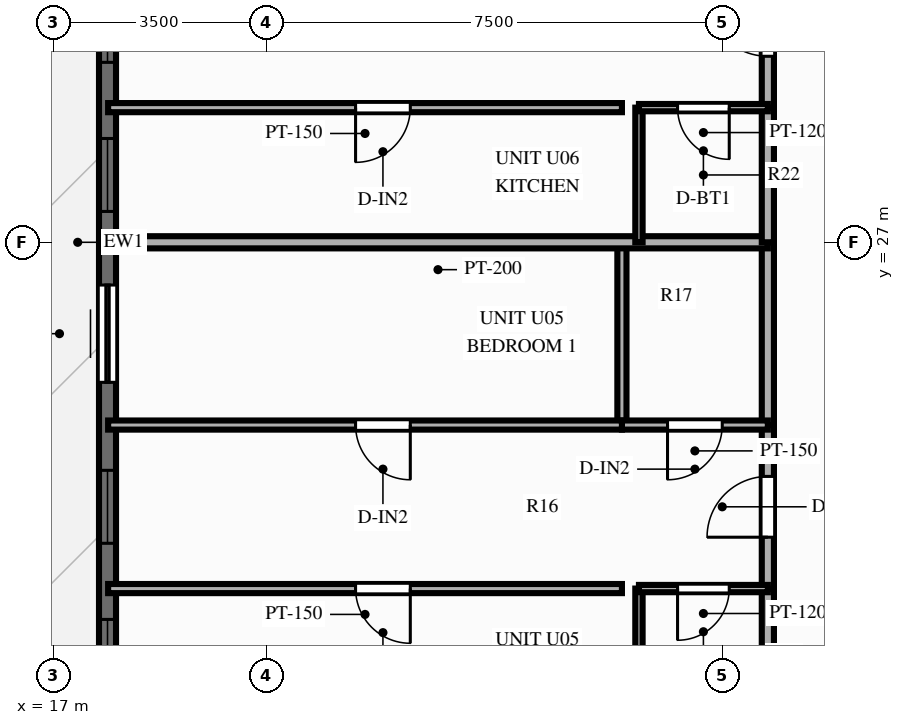
"""IFC4 building model, lengths in metres.
Left out: names, types, materials, properties, quantities, classifications, styles, units other than length and angle.
Written with IfcOpenShell. Run it as: python <this file> out.ifc"""

import sys

from ifc_helpers import new_model, si_unit, direction, frame, frame_2d, origin, place, context, subcontext, project, spatial, rectangle, extrude, source, transform, mapped, element, fill, save


model = new_model("IFC4")
c1 = context("Model", 3, precision=1e-05, world=origin(), true_north=direction((0.0, 1.0)))
c2 = subcontext(c1, "Body", "Model", "MODEL_VIEW")
j1 = project(units=[si_unit("LENGTHUNIT", "METRE"), si_unit("PLANEANGLEUNIT", "RADIAN")], contexts=[c1])
p1 = place(None, origin())
s1 = spatial("IfcSite", under=j1, at=p1, CompositionType="ELEMENT")
p2 = place(p1, origin())
s2 = spatial("IfcBuilding", under=s1, at=p2, CompositionType="ELEMENT")
p3 = place(p2, frame((0.0, 0.0, 189.7)))
s3 = spatial("IfcBuildingStorey", under=s2, at=p3, CompositionType="ELEMENT", Elevation=189.7)
p4 = place(p3, frame((17.89, 11.0, 0.0), z_axis=(0.0, 0.0, 1.0), x_axis=(0.0, 1.0, 0.0)))
e1 = element("IfcWall", 1, at=p4, inside=s3, PredefinedType="SOLIDWALL", context=c2, shape_type="SweptSolid", body=[
    extrude(rectangle(XDim=32.0, YDim=0.28, at=frame_2d((16.0, 0.0))), origin(), (0.0, 0.0, 1.0), 2.28),
])
p5 = place(p4, frame((0.717, 0.0, 0.25)))
e2 = element("IfcOpeningElement", 2, at=p5, cuts=e1, PredefinedType="OPENING", context=c2, shape_type="SweptSolid", body=[
    extrude(rectangle(XDim=1.2, YDim=1.5, at=frame_2d((0.6, 0.75))), frame((0.0, 0.152, 0.0), z_axis=(0.0, -1.0, 0.0), x_axis=(1.0, 0.0, 0.0)), (0.0, 0.0, 1.0), 0.304),
])
p6 = place(p4, frame((3.139, 0.0, 0.25)))
e3 = element("IfcOpeningElement", 3, at=p6, cuts=e1, PredefinedType="OPENING", context=c2, shape_type="SweptSolid", body=[
    extrude(rectangle(XDim=1.2, YDim=1.5, at=frame_2d((0.6, 0.75))), frame((0.0, 0.152, 0.0), z_axis=(0.0, -1.0, 0.0), x_axis=(1.0, 0.0, 0.0)), (0.0, 0.0, 1.0), 0.304),
])
p7 = place(p4, frame((5.447, 0.0, 0.25)))
e4 = element("IfcOpeningElement", 4, at=p7, cuts=e1, PredefinedType="OPENING", context=c2, shape_type="SweptSolid", body=[
    extrude(rectangle(XDim=0.95, YDim=1.5, at=frame_2d((0.475, 0.75))), frame((0.0, 0.152, 0.0), z_axis=(0.0, -1.0, 0.0), x_axis=(1.0, 0.0, 0.0)), (0.0, 0.0, 1.0), 0.304),
])
p8 = place(p4, frame((8.597, 0.0, 0.25)))
e5 = element("IfcOpeningElement", 5, at=p8, cuts=e1, PredefinedType="OPENING", context=c2, shape_type="SweptSolid", body=[
    extrude(rectangle(XDim=1.2, YDim=1.5, at=frame_2d((0.6, 0.75))), frame((0.0, 0.152, 0.0), z_axis=(0.0, -1.0, 0.0), x_axis=(1.0, 0.0, 0.0)), (0.0, 0.0, 1.0), 0.304),
])
p9 = place(p4, frame((11.05, 0.0, 0.25)))
e6 = element("IfcOpeningElement", 6, at=p9, cuts=e1, PredefinedType="OPENING", context=c2, shape_type="SweptSolid", body=[
    extrude(rectangle(XDim=1.2, YDim=1.5, at=frame_2d((0.6, 0.75))), frame((0.0, 0.152, 0.0), z_axis=(0.0, -1.0, 0.0), x_axis=(1.0, 0.0, 0.0)), (0.0, 0.0, 1.0), 0.304),
])
p10 = place(p4, frame((13.697, 0.0, 0.0)))
e7 = element("IfcOpeningElement", 7, at=p10, cuts=e1, PredefinedType="OPENING", context=c2, shape_type="SweptSolid", body=[
    extrude(rectangle(XDim=1.6, YDim=2.15, at=frame_2d((0.8, 1.075))), frame((0.0, 0.152, 0.0), z_axis=(0.0, -1.0, 0.0), x_axis=(1.0, 0.0, 0.0)), (0.0, 0.0, 1.0), 0.304),
])
p11 = place(p4, frame((16.507, 0.0, 0.25)))
e8 = element("IfcOpeningElement", 8, at=p11, cuts=e1, PredefinedType="OPENING", context=c2, shape_type="SweptSolid", body=[
    extrude(rectangle(XDim=1.2, YDim=1.5, at=frame_2d((0.6, 0.75))), frame((0.0, 0.152, 0.0), z_axis=(0.0, -1.0, 0.0), x_axis=(1.0, 0.0, 0.0)), (0.0, 0.0, 1.0), 0.304),
])
p12 = place(p4, frame((18.959, 0.0, 0.25)))
e9 = element("IfcOpeningElement", 9, at=p12, cuts=e1, PredefinedType="OPENING", context=c2, shape_type="SweptSolid", body=[
    extrude(rectangle(XDim=1.2, YDim=1.5, at=frame_2d((0.6, 0.75))), frame((0.0, 0.152, 0.0), z_axis=(0.0, -1.0, 0.0), x_axis=(1.0, 0.0, 0.0)), (0.0, 0.0, 1.0), 0.304),
])
p13 = place(p4, frame((21.807, 0.0, 0.25)))
e10 = element("IfcOpeningElement", 10, at=p13, cuts=e1, PredefinedType="OPENING", context=c2, shape_type="SweptSolid", body=[
    extrude(rectangle(XDim=1.2, YDim=1.5, at=frame_2d((0.6, 0.75))), frame((0.0, 0.152, 0.0), z_axis=(0.0, -1.0, 0.0), x_axis=(1.0, 0.0, 0.0)), (0.0, 0.0, 1.0), 0.304),
])
p14 = place(p4, frame((26.967, 0.0, 0.25)))
e11 = element("IfcOpeningElement", 11, at=p14, cuts=e1, PredefinedType="OPENING", context=c2, shape_type="SweptSolid", body=[
    extrude(rectangle(XDim=1.2, YDim=1.5, at=frame_2d((0.6, 0.75))), frame((0.0, 0.152, 0.0), z_axis=(0.0, -1.0, 0.0), x_axis=(1.0, 0.0, 0.0)), (0.0, 0.0, 1.0), 0.304),
])
p15 = place(p4, frame((29.687, 0.0, 0.25)))
e12 = element("IfcOpeningElement", 12, at=p15, cuts=e1, PredefinedType="OPENING", context=c2, shape_type="SweptSolid", body=[
    extrude(rectangle(XDim=1.2, YDim=1.5, at=frame_2d((0.6, 0.75))), frame((0.0, 0.152, 0.0), z_axis=(0.0, -1.0, 0.0), x_axis=(1.0, 0.0, 0.0)), (0.0, 0.0, 1.0), 0.304),
])
p16 = place(p3, frame((28.75, 19.09, 0.0), z_axis=(0.0, 0.0, 1.0), x_axis=(0.0, 1.0, 0.0)))
e13 = element("IfcWall", 13, at=p16, inside=s3, PredefinedType="PARTITIONING", context=c2, shape_type="SweptSolid", body=[
    extrude(rectangle(XDim=2.215, YDim=0.2, at=frame_2d((1.107, 0.0))), origin(), (0.0, 0.0, 1.0), 2.79),
])
p17 = place(p3, frame((28.75, 21.305, 0.0), z_axis=(0.0, 0.0, 1.0), x_axis=(0.0, 1.0, 0.0)))
e14 = element("IfcWall", 14, at=p17, inside=s3, PredefinedType="PARTITIONING", context=c2, shape_type="SweptSolid", body=[
    extrude(rectangle(XDim=2.689, YDim=0.2, at=frame_2d((1.345, 0.0))), origin(), (0.0, 0.0, 1.0), 2.79),
])
p18 = place(p17, frame((0.845, 0.0, 0.0)))
e15 = element("IfcOpeningElement", 15, at=p18, cuts=e14, PredefinedType="OPENING", context=c2, shape_type="SweptSolid", body=[
    extrude(rectangle(XDim=1.0, YDim=2.15, at=frame_2d((0.5, 1.075))), frame((0.0, 0.112, 0.0), z_axis=(0.0, -1.0, 0.0), x_axis=(1.0, 0.0, 0.0)), (0.0, 0.0, 1.0), 0.224),
])
p19 = place(p3, frame((28.75, 23.994, 0.0), z_axis=(0.0, 0.0, 1.0), x_axis=(0.0, 1.0, 0.0)))
e16 = element("IfcWall", 16, at=p19, inside=s3, PredefinedType="PARTITIONING", context=c2, shape_type="SweptSolid", body=[
    extrude(rectangle(XDim=3.006, YDim=0.2, at=frame_2d((1.503, 0.0))), origin(), (0.0, 0.0, 1.0), 2.79),
])
p20 = place(p3, frame((26.63, 19.09, 0.0), z_axis=(0.0, 0.0, 1.0), x_axis=(0.0, 1.0, 0.0)))
e17 = element("IfcWall", 17, at=p20, inside=s3, PredefinedType="PARTITIONING", context=c2, shape_type="SweptSolid", body=[
    extrude(rectangle(XDim=2.215, YDim=0.12, at=frame_2d((1.107, 0.0))), origin(), (0.0, 0.0, 1.0), 2.79),
])
p21 = place(p3, frame((26.35, 23.994, 0.0), z_axis=(0.0, 0.0, 1.0), x_axis=(0.0, 1.0, 0.0)))
e18 = element("IfcWall", 18, at=p21, inside=s3, PredefinedType="PARTITIONING", context=c2, shape_type="SweptSolid", body=[
    extrude(rectangle(XDim=3.006, YDim=0.15, at=frame_2d((1.503, 0.0))), origin(), (0.0, 0.0, 1.0), 2.79),
])
p22 = place(p3, frame((28.75, 21.305, 0.0), z_axis=(0.0, 0.0, 1.0), x_axis=(-1.0, 0.0, 0.0)))
e19 = element("IfcWall", 19, at=p22, inside=s3, PredefinedType="PARTITIONING", context=c2, shape_type="SweptSolid", body=[
    extrude(rectangle(XDim=2.12, YDim=0.12, at=frame_2d((1.06, 0.0))), origin(), (0.0, 0.0, 1.0), 2.79),
])
p23 = place(p22, frame((0.635, 0.0, 0.0)))
e20 = element("IfcOpeningElement", 20, at=p23, cuts=e19, PredefinedType="OPENING", context=c2, shape_type="SweptSolid", body=[
    extrude(rectangle(XDim=0.85, YDim=2.05, at=frame_2d((0.425, 1.025))), frame((0.0, 0.072, 0.0), z_axis=(0.0, -1.0, 0.0), x_axis=(1.0, 0.0, 0.0)), (0.0, 0.0, 1.0), 0.144),
])
p24 = place(p3, frame((26.35, 21.305, 0.0), z_axis=(0.0, 0.0, 1.0), x_axis=(-1.0, 0.0, 0.0)))
e21 = element("IfcWall", 21, at=p24, inside=s3, PredefinedType="PARTITIONING", context=c2, shape_type="SweptSolid", body=[
    extrude(rectangle(XDim=8.45, YDim=0.15, at=frame_2d((4.225, 0.0))), origin(), (0.0, 0.0, 1.0), 2.79),
])
p25 = place(p24, frame((3.48, 0.0, 0.0)))
e22 = element("IfcOpeningElement", 22, at=p25, cuts=e21, PredefinedType="OPENING", context=c2, shape_type="SweptSolid", body=[
    extrude(rectangle(XDim=0.9, YDim=2.1, at=frame_2d((0.45, 1.05))), frame((0.0, 0.087, 0.0), z_axis=(0.0, -1.0, 0.0), x_axis=(1.0, 0.0, 0.0)), (0.0, 0.0, 1.0), 0.174),
])
p26 = place(p3, frame((28.75, 23.994, 0.0), z_axis=(0.0, 0.0, 1.0), x_axis=(-1.0, 0.0, 0.0)))
e23 = element("IfcWall", 23, at=p26, inside=s3, PredefinedType="PARTITIONING", context=c2, shape_type="SweptSolid", body=[
    extrude(rectangle(XDim=2.4, YDim=0.15, at=frame_2d((1.2, 0.0))), origin(), (0.0, 0.0, 1.0), 2.79),
])
p27 = place(p26, frame((0.75, 0.0, 0.0)))
e24 = element("IfcOpeningElement", 24, at=p27, cuts=e23, PredefinedType="OPENING", context=c2, shape_type="SweptSolid", body=[
    extrude(rectangle(XDim=0.9, YDim=2.1, at=frame_2d((0.45, 1.05))), frame((0.0, 0.087, 0.0), z_axis=(0.0, -1.0, 0.0), x_axis=(1.0, 0.0, 0.0)), (0.0, 0.0, 1.0), 0.174),
])
p28 = place(p3, frame((26.35, 23.994, 0.0), z_axis=(0.0, 0.0, 1.0), x_axis=(-1.0, 0.0, 0.0)))
e25 = element("IfcWall", 25, at=p28, inside=s3, PredefinedType="PARTITIONING", context=c2, shape_type="SweptSolid", body=[
    extrude(rectangle(XDim=8.45, YDim=0.15, at=frame_2d((4.225, 0.0))), origin(), (0.0, 0.0, 1.0), 2.79),
])
p29 = place(p28, frame((3.48, 0.0, 0.0)))
e26 = element("IfcOpeningElement", 26, at=p29, cuts=e25, PredefinedType="OPENING", context=c2, shape_type="SweptSolid", body=[
    extrude(rectangle(XDim=0.9, YDim=2.1, at=frame_2d((0.45, 1.05))), frame((0.0, 0.087, 0.0), z_axis=(0.0, -1.0, 0.0), x_axis=(1.0, 0.0, 0.0)), (0.0, 0.0, 1.0), 0.174),
])
p30 = place(p3, frame((28.75, 27.0, 0.0), z_axis=(0.0, 0.0, 1.0), x_axis=(-1.0, 0.0, 0.0)))
e27 = element("IfcWall", 27, at=p30, inside=s3, PredefinedType="PARTITIONING", context=c2, shape_type="SweptSolid", body=[
    extrude(rectangle(XDim=10.85, YDim=0.2, at=frame_2d((5.425, 0.0))), origin(), (0.0, 0.0, 1.0), 2.79),
])
p31 = place(p3, frame((28.75, 27.0, 0.0), z_axis=(0.0, 0.0, 1.0), x_axis=(0.0, 1.0, 0.0)))
e28 = element("IfcWall", 28, at=p31, inside=s3, PredefinedType="PARTITIONING", context=c2, shape_type="SweptSolid", body=[
    extrude(rectangle(XDim=2.215, YDim=0.2, at=frame_2d((1.107, 0.0))), origin(), (0.0, 0.0, 1.0), 2.79),
])
p32 = place(p3, frame((28.75, 29.215, 0.0), z_axis=(0.0, 0.0, 1.0), x_axis=(0.0, 1.0, 0.0)))
e29 = element("IfcWall", 29, at=p32, inside=s3, PredefinedType="PARTITIONING", context=c2, shape_type="SweptSolid", body=[
    extrude(rectangle(XDim=2.689, YDim=0.2, at=frame_2d((1.345, 0.0))), origin(), (0.0, 0.0, 1.0), 2.79),
])
p33 = place(p32, frame((0.845, 0.0, 0.0)))
e30 = element("IfcOpeningElement", 30, at=p33, cuts=e29, PredefinedType="OPENING", context=c2, shape_type="SweptSolid", body=[
    extrude(rectangle(XDim=1.0, YDim=2.15, at=frame_2d((0.5, 1.075))), frame((0.0, 0.112, 0.0), z_axis=(0.0, -1.0, 0.0), x_axis=(1.0, 0.0, 0.0)), (0.0, 0.0, 1.0), 0.224),
])
p34 = place(p3, frame((26.63, 27.0, 0.0), z_axis=(0.0, 0.0, 1.0), x_axis=(0.0, 1.0, 0.0)))
e31 = element("IfcWall", 31, at=p34, inside=s3, PredefinedType="PARTITIONING", context=c2, shape_type="SweptSolid", body=[
    extrude(rectangle(XDim=2.215, YDim=0.12, at=frame_2d((1.107, 0.0))), origin(), (0.0, 0.0, 1.0), 2.79),
])
p35 = place(p3, frame((28.75, 29.215, 0.0), z_axis=(0.0, 0.0, 1.0), x_axis=(-1.0, 0.0, 0.0)))
e32 = element("IfcWall", 32, at=p35, inside=s3, PredefinedType="PARTITIONING", context=c2, shape_type="SweptSolid", body=[
    extrude(rectangle(XDim=2.12, YDim=0.12, at=frame_2d((1.06, 0.0))), origin(), (0.0, 0.0, 1.0), 2.79),
])
p36 = place(p35, frame((0.635, 0.0, 0.0)))
e33 = element("IfcOpeningElement", 33, at=p36, cuts=e32, PredefinedType="OPENING", context=c2, shape_type="SweptSolid", body=[
    extrude(rectangle(XDim=0.85, YDim=2.05, at=frame_2d((0.425, 1.025))), frame((0.0, 0.072, 0.0), z_axis=(0.0, -1.0, 0.0), x_axis=(1.0, 0.0, 0.0)), (0.0, 0.0, 1.0), 0.144),
])
p37 = place(p3, frame((26.35, 29.215, 0.0), z_axis=(0.0, 0.0, 1.0), x_axis=(-1.0, 0.0, 0.0)))
e34 = element("IfcWall", 34, at=p37, inside=s3, PredefinedType="PARTITIONING", context=c2, shape_type="SweptSolid", body=[
    extrude(rectangle(XDim=8.45, YDim=0.15, at=frame_2d((4.225, 0.0))), origin(), (0.0, 0.0, 1.0), 2.79),
])
p38 = place(p37, frame((3.48, 0.0, 0.0)))
e35 = element("IfcOpeningElement", 35, at=p38, cuts=e34, PredefinedType="OPENING", context=c2, shape_type="SweptSolid", body=[
    extrude(rectangle(XDim=0.9, YDim=2.1, at=frame_2d((0.45, 1.05))), frame((0.0, 0.087, 0.0), z_axis=(0.0, -1.0, 0.0), x_axis=(1.0, 0.0, 0.0)), (0.0, 0.0, 1.0), 0.174),
])
m1 = source(origin(), c2, "Body", "SweptSolid", [
    extrude(rectangle(XDim=1.2, YDim=1.5, at=frame_2d((0.6, 0.75))), frame((0.0, 0.03, 0.0), z_axis=(0.0, -1.0, 0.0), x_axis=(1.0, 0.0, 0.0)), (0.0, 0.0, 1.0), 0.06),
])
p39 = place(p8, origin())
e36 = element("IfcWindow", 36, at=p39, inside=s3, PartitioningType="SINGLE_PANEL", PredefinedType="WINDOW", context=c2, shape_type="MappedRepresentation", body=[
    mapped(m1, transform((0.0, 0.0, 0.0), scale=1.0)),
])
fill(e5, e36)
p40 = place(p9, origin())
e37 = element("IfcWindow", 37, at=p40, inside=s3, PartitioningType="SINGLE_PANEL", PredefinedType="WINDOW", context=c2, shape_type="MappedRepresentation", body=[
    mapped(m1, transform((0.0, 0.0, 0.0), scale=1.0)),
])
fill(e6, e37)
m2 = source(origin(), c2, "Body", "SweptSolid", [
    extrude(rectangle(XDim=1.6, YDim=2.15, at=frame_2d((0.8, 1.075))), frame((0.0, 0.025, 0.0), z_axis=(0.0, -1.0, 0.0), x_axis=(1.0, 0.0, 0.0)), (0.0, 0.0, 1.0), 0.05),
])
p41 = place(p10, origin())
e38 = element("IfcDoor", 38, at=p41, inside=s3, OperationType="SLIDING_TO_LEFT", PredefinedType="DOOR", context=c2, shape_type="MappedRepresentation", body=[
    mapped(m2, transform((0.0, 0.0, 0.0), scale=1.0)),
])
fill(e7, e38)
p42 = place(p11, origin())
e39 = element("IfcWindow", 39, at=p42, inside=s3, PartitioningType="SINGLE_PANEL", PredefinedType="WINDOW", context=c2, shape_type="MappedRepresentation", body=[
    mapped(m1, transform((0.0, 0.0, 0.0), scale=1.0)),
])
fill(e8, e39)
p43 = place(p12, origin())
e40 = element("IfcWindow", 40, at=p43, inside=s3, PartitioningType="SINGLE_PANEL", PredefinedType="WINDOW", context=c2, shape_type="MappedRepresentation", body=[
    mapped(m1, transform((0.0, 0.0, 0.0), scale=1.0)),
])
fill(e9, e40)
m3 = source(origin(), c2, "Body", "SweptSolid", [
    extrude(rectangle(XDim=1.0, YDim=2.15, at=frame_2d((0.5, 1.075))), frame((0.0, 0.025, 0.0), z_axis=(0.0, -1.0, 0.0), x_axis=(1.0, 0.0, 0.0)), (0.0, 0.0, 1.0), 0.05),
])
p44 = place(p18, origin())
e41 = element("IfcDoor", 41, at=p44, inside=s3, OperationType="SINGLE_SWING_LEFT", PredefinedType="DOOR", context=c2, shape_type="MappedRepresentation", body=[
    mapped(m3, transform((0.0, 0.0, 0.0), scale=1.0)),
])
fill(e15, e41)
m4 = source(origin(), c2, "Body", "SweptSolid", [
    extrude(rectangle(XDim=0.85, YDim=2.05, at=frame_2d((0.425, 1.025))), frame((0.0, 0.025, 0.0), z_axis=(0.0, -1.0, 0.0), x_axis=(1.0, 0.0, 0.0)), (0.0, 0.0, 1.0), 0.05),
])
p45 = place(p23, origin())
e42 = element("IfcDoor", 42, at=p45, inside=s3, OperationType="SINGLE_SWING_RIGHT", PredefinedType="DOOR", context=c2, shape_type="MappedRepresentation", body=[
    mapped(m4, transform((0.0, 0.0, 0.0), scale=1.0)),
])
fill(e20, e42)
m5 = source(origin(), c2, "Body", "SweptSolid", [
    extrude(rectangle(XDim=0.9, YDim=2.1, at=frame_2d((0.45, 1.05))), frame((0.0, 0.025, 0.0), z_axis=(0.0, -1.0, 0.0), x_axis=(1.0, 0.0, 0.0)), (0.0, 0.0, 1.0), 0.05),
])
p46 = place(p25, origin())
e43 = element("IfcDoor", 43, at=p46, inside=s3, OperationType="SINGLE_SWING_LEFT", PredefinedType="DOOR", context=c2, shape_type="MappedRepresentation", body=[
    mapped(m5, transform((0.0, 0.0, 0.0), scale=1.0)),
])
fill(e22, e43)
p47 = place(p27, origin())
e44 = element("IfcDoor", 44, at=p47, inside=s3, OperationType="SINGLE_SWING_RIGHT", PredefinedType="DOOR", context=c2, shape_type="MappedRepresentation", body=[
    mapped(m5, transform((0.0, 0.0, 0.0), scale=1.0)),
])
fill(e24, e44)
p48 = place(p29, origin())
e45 = element("IfcDoor", 45, at=p48, inside=s3, OperationType="SINGLE_SWING_LEFT", PredefinedType="DOOR", context=c2, shape_type="MappedRepresentation", body=[
    mapped(m5, transform((0.0, 0.0, 0.0), scale=1.0)),
])
fill(e26, e45)
p49 = place(p33, origin())
e46 = element("IfcDoor", 46, at=p49, inside=s3, OperationType="SINGLE_SWING_RIGHT", PredefinedType="DOOR", context=c2, shape_type="MappedRepresentation", body=[
    mapped(m3, transform((0.0, 0.0, 0.0), scale=1.0)),
])
fill(e30, e46)
p50 = place(p36, origin())
e47 = element("IfcDoor", 47, at=p50, inside=s3, OperationType="SINGLE_SWING_LEFT", PredefinedType="DOOR", context=c2, shape_type="MappedRepresentation", body=[
    mapped(m4, transform((0.0, 0.0, 0.0), scale=1.0)),
])
fill(e33, e47)
p51 = place(p38, origin())
e48 = element("IfcDoor", 48, at=p51, inside=s3, OperationType="SINGLE_SWING_RIGHT", PredefinedType="DOOR", context=c2, shape_type="MappedRepresentation", body=[
    mapped(m5, transform((0.0, 0.0, 0.0), scale=1.0)),
])
fill(e35, e48)
save(model, sys.argv[1])
